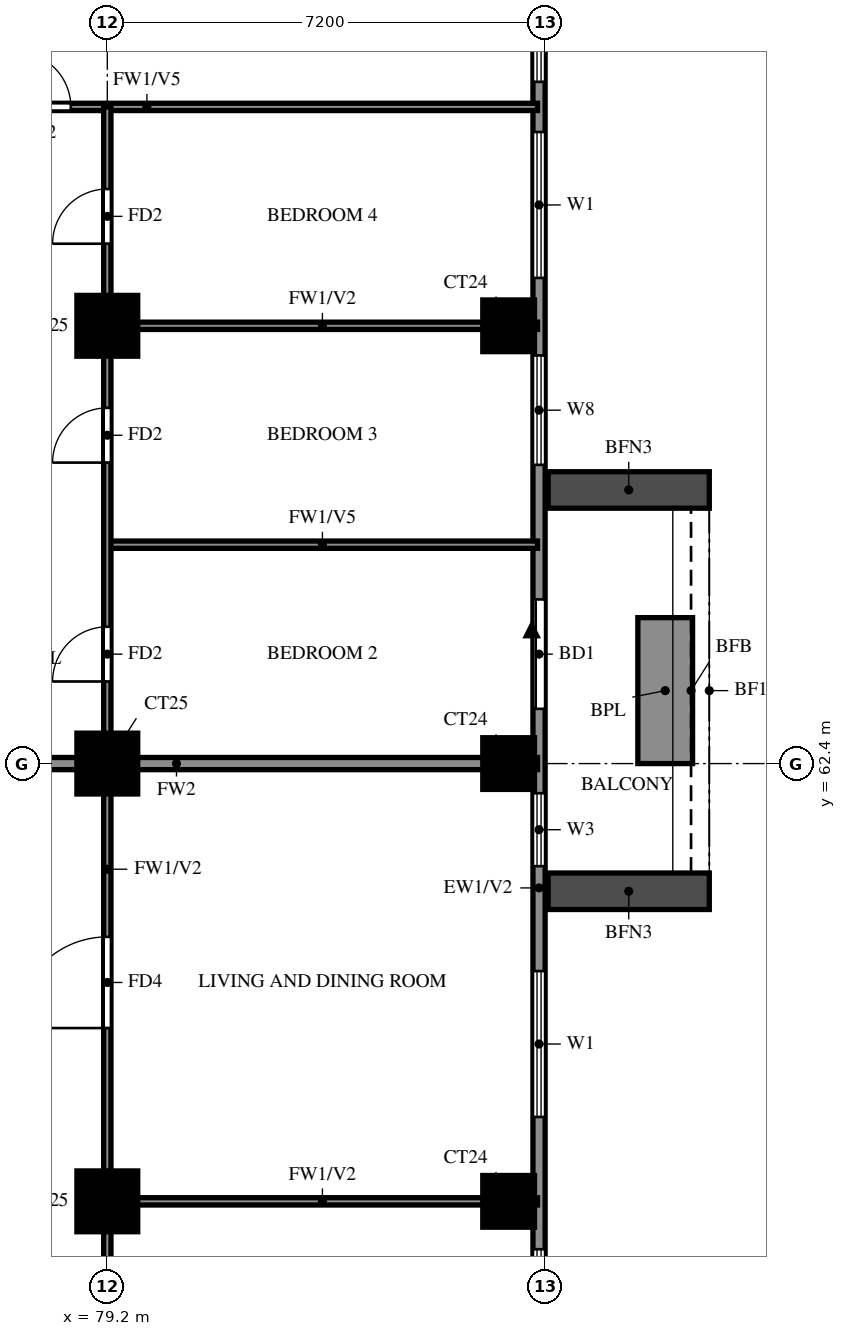
"""IFC4 building model, lengths in metres.
Left out: names, types, materials, properties, quantities, classifications, styles, units other than length and angle.
Written with IfcOpenShell. Run it as: python <this file> out.ifc"""

import sys

from ifc_helpers import new_model, si_unit, direction, frame, frame_2d, origin, origin_2d, place, context, subcontext, project, spatial, rectangle, extrude, source, transform, mapped, element, fill, save


model = new_model("IFC4")
c1 = context("Model", 3, precision=1e-05, world=origin(), true_north=direction((0.0, 1.0)))
c2 = subcontext(c1, "Body", "Model", "MODEL_VIEW")
j1 = project(units=[si_unit("LENGTHUNIT", "METRE"), si_unit("PLANEANGLEUNIT", "RADIAN")], contexts=[c1])
p1 = place(None, origin())
s1 = spatial("IfcSite", under=j1, at=p1, CompositionType="ELEMENT")
p2 = place(p1, origin())
s2 = spatial("IfcBuilding", under=s1, at=p2, CompositionType="ELEMENT")
p3 = place(p2, frame((0.0, 0.0, 153.5)))
s3 = spatial("IfcBuildingStorey", under=s2, at=p3, CompositionType="ELEMENT", Elevation=153.5)
m1 = source(origin(), c2, "Body", "SweptSolid", [
    extrude(rectangle(XDim=1.0, YDim=1.0, at=origin_2d()), origin(), (0.0, 0.0, 1.0), 3.2),
])
p4 = place(p3, frame((79.2, 55.2, 0.0), z_axis=(0.0, 0.0, 1.0), x_axis=(1.0, 0.0, 0.0)))
e1 = element("IfcColumn", 1, at=p4, inside=s3, PredefinedType="COLUMN", context=c2, shape_type="MappedRepresentation", body=[
    mapped(m1, transform((0.0, 0.0, 0.0))),
])
m2 = source(origin(), c2, "Body", "SweptSolid", [
    extrude(rectangle(XDim=0.85, YDim=0.85, at=origin_2d()), origin(), (0.0, 0.0, 1.0), 3.2),
])
p5 = place(p3, frame((85.8, 55.2, 0.0), z_axis=(0.0, 0.0, 1.0), x_axis=(1.0, 0.0, 0.0)))
e2 = element("IfcColumn", 2, at=p5, inside=s3, PredefinedType="COLUMN", context=c2, shape_type="MappedRepresentation", body=[
    mapped(m2, transform((0.0, 0.0, 0.0))),
])
p6 = place(p3, frame((79.2, 62.4, 0.0), z_axis=(0.0, 0.0, 1.0), x_axis=(1.0, 0.0, 0.0)))
e3 = element("IfcColumn", 3, at=p6, inside=s3, PredefinedType="COLUMN", context=c2, shape_type="MappedRepresentation", body=[
    mapped(m1, transform((0.0, 0.0, 0.0))),
])
p7 = place(p3, frame((85.8, 62.4, 0.0), z_axis=(0.0, 0.0, 1.0), x_axis=(1.0, 0.0, 0.0)))
e4 = element("IfcColumn", 4, at=p7, inside=s3, PredefinedType="COLUMN", context=c2, shape_type="MappedRepresentation", body=[
    mapped(m2, transform((0.0, 0.0, 0.0))),
])
p8 = place(p3, frame((79.2, 69.6, 0.0), z_axis=(0.0, 0.0, 1.0), x_axis=(1.0, 0.0, 0.0)))
e5 = element("IfcColumn", 5, at=p8, inside=s3, PredefinedType="COLUMN", context=c2, shape_type="MappedRepresentation", body=[
    mapped(m1, transform((0.0, 0.0, 0.0))),
])
p9 = place(p3, frame((85.8, 69.6, 0.0), z_axis=(0.0, 0.0, 1.0), x_axis=(1.0, 0.0, 0.0)))
e6 = element("IfcColumn", 6, at=p9, inside=s3, PredefinedType="COLUMN", context=c2, shape_type="MappedRepresentation", body=[
    mapped(m2, transform((0.0, 0.0, 0.0))),
])
p10 = place(p3, frame((86.3, 48.2, 0.0), z_axis=(0.0, 0.0, 1.0), x_axis=(0.0, 1.0, 0.0)))
e7 = element("IfcWall", 7, at=p10, inside=s3, PredefinedType="SOLIDWALL", context=c2, shape_type="SweptSolid", body=[
    extrude(rectangle(XDim=28.6, YDim=0.2, at=frame_2d((14.3, 0.0))), origin(), (0.0, 0.0, 1.0), 3.2),
])
p11 = place(p10, frame((15.1, 0.0, 0.0)))
e8 = element("IfcOpeningElement", 8, at=p11, cuts=e7, PredefinedType="OPENING", context=c2, shape_type="SweptSolid", body=[
    extrude(rectangle(XDim=1.8, YDim=2.4, at=frame_2d((0.9, 1.2))), frame((0.0, 0.11, 0.0), z_axis=(0.0, -1.0, 0.0), x_axis=(1.0, 0.0, 0.0)), (0.0, 0.0, 1.0), 0.22),
])
p12 = place(p10, frame((0.6, 0.0, 0.6)))
e9 = element("IfcOpeningElement", 9, at=p12, cuts=e7, PredefinedType="OPENING", context=c2, shape_type="SweptSolid", body=[
    extrude(rectangle(XDim=2.4, YDim=2.4, at=frame_2d((1.2, 1.2))), frame((0.0, 0.11, 0.0), z_axis=(0.0, -1.0, 0.0), x_axis=(1.0, 0.0, 0.0)), (0.0, 0.0, 1.0), 0.22),
])
p13 = place(p10, frame((3.812, 0.0, 0.6)))
e10 = element("IfcOpeningElement", 10, at=p13, cuts=e7, PredefinedType="OPENING", context=c2, shape_type="SweptSolid", body=[
    extrude(rectangle(XDim=2.4, YDim=2.4, at=frame_2d((1.2, 1.2))), frame((0.0, 0.11, 0.0), z_axis=(0.0, -1.0, 0.0), x_axis=(1.0, 0.0, 0.0)), (0.0, 0.0, 1.0), 0.22),
])
p14 = place(p10, frame((8.387, 0.0, 0.6)))
e11 = element("IfcOpeningElement", 11, at=p14, cuts=e7, PredefinedType="OPENING", context=c2, shape_type="SweptSolid", body=[
    extrude(rectangle(XDim=2.4, YDim=2.4, at=frame_2d((1.2, 1.2))), frame((0.0, 0.11, 0.0), z_axis=(0.0, -1.0, 0.0), x_axis=(1.0, 0.0, 0.0)), (0.0, 0.0, 1.0), 0.22),
])
p15 = place(p10, frame((12.512, 0.0, 0.6)))
e12 = element("IfcOpeningElement", 12, at=p15, cuts=e7, PredefinedType="OPENING", context=c2, shape_type="SweptSolid", body=[
    extrude(rectangle(XDim=1.2, YDim=2.4, at=frame_2d((0.6, 1.2))), frame((0.0, 0.11, 0.0), z_axis=(0.0, -1.0, 0.0), x_axis=(1.0, 0.0, 0.0)), (0.0, 0.0, 1.0), 0.22),
])
p16 = place(p10, frame((19.113, 0.0, 0.6)))
e13 = element("IfcOpeningElement", 13, at=p16, cuts=e7, PredefinedType="OPENING", context=c2, shape_type="SweptSolid", body=[
    extrude(rectangle(XDim=1.8, YDim=2.4, at=frame_2d((0.9, 1.2))), frame((0.0, 0.11, 0.0), z_axis=(0.0, -1.0, 0.0), x_axis=(1.0, 0.0, 0.0)), (0.0, 0.0, 1.0), 0.22),
])
p17 = place(p10, frame((22.188, 0.0, 0.6)))
e14 = element("IfcOpeningElement", 14, at=p17, cuts=e7, PredefinedType="OPENING", context=c2, shape_type="SweptSolid", body=[
    extrude(rectangle(XDim=2.4, YDim=2.4, at=frame_2d((1.2, 1.2))), frame((0.0, 0.11, 0.0), z_axis=(0.0, -1.0, 0.0), x_axis=(1.0, 0.0, 0.0)), (0.0, 0.0, 1.0), 0.22),
])
p18 = place(p10, frame((25.413, 0.0, 0.6)))
e15 = element("IfcOpeningElement", 15, at=p18, cuts=e7, PredefinedType="OPENING", context=c2, shape_type="SweptSolid", body=[
    extrude(rectangle(XDim=2.4, YDim=2.4, at=frame_2d((1.2, 1.2))), frame((0.0, 0.11, 0.0), z_axis=(0.0, -1.0, 0.0), x_axis=(1.0, 0.0, 0.0)), (0.0, 0.0, 1.0), 0.22),
])
for number, where, z_axis, x_axis in (
    (16, (86.45, 60.3, 0.0), (0.0, 0.0, 1.0), (1.0, 0.0, 0.0)),
    (17, (86.45, 66.9, 0.0), (0.0, 0.0, 1.0), (1.0, 0.0, 0.0)),
):
    element("IfcWall", number, at=place(p3, frame(where, z_axis=z_axis, x_axis=x_axis)), inside=s3, PredefinedType="SOLIDWALL", context=c2, shape_type="SweptSolid", body=[
        extrude(rectangle(XDim=2.65, YDim=0.6, at=frame_2d((1.325, 0.0))), origin(), (0.0, 0.0, 1.0), 2.85),
    ])
p19 = place(p3, frame((88.375, 62.4, 0.0), z_axis=(0.0, 0.0, 1.0), x_axis=(0.0, 1.0, 0.0)))
e18 = element("IfcWall", 18, at=p19, inside=s3, PredefinedType="SOLIDWALL", context=c2, shape_type="SweptSolid", body=[
    extrude(rectangle(XDim=2.4, YDim=0.9, at=frame_2d((1.2, 0.0))), origin(), (0.0, 0.0, 1.0), 0.9),
])
p20 = place(p3, frame((74.4, 62.4, 0.0), z_axis=(0.0, 0.0, 1.0), x_axis=(1.0, 0.0, 0.0)))
e19 = element("IfcWall", 19, at=p20, inside=s3, PredefinedType="SOLIDWALL", context=c2, shape_type="SweptSolid", body=[
    extrude(rectangle(XDim=11.875, YDim=0.2, at=frame_2d((5.938, 0.0))), origin(), (0.0, 0.0, 1.0), 3.2),
])
p21 = place(p3, frame((79.2, 55.2, 0.0), z_axis=(0.0, 0.0, 1.0), x_axis=(1.0, 0.0, 0.0)))
e20 = element("IfcWall", 20, at=p21, inside=s3, PredefinedType="PARTITIONING", context=c2, shape_type="SweptSolid", body=[
    extrude(rectangle(XDim=7.075, YDim=0.12, at=frame_2d((3.538, 0.0))), origin(), (0.0, 0.0, 1.0), 3.2),
])
p22 = place(p3, frame((79.2, 66.0, 0.0), z_axis=(0.0, 0.0, 1.0), x_axis=(1.0, 0.0, 0.0)))
e21 = element("IfcWall", 21, at=p22, inside=s3, PredefinedType="PARTITIONING", context=c2, shape_type="SweptSolid", body=[
    extrude(rectangle(XDim=7.075, YDim=0.12, at=frame_2d((3.538, 0.0))), origin(), (0.0, 0.0, 1.0), 2.3),
])
p23 = place(p3, frame((79.2, 69.6, 0.0), z_axis=(0.0, 0.0, 1.0), x_axis=(1.0, 0.0, 0.0)))
e22 = element("IfcWall", 22, at=p23, inside=s3, PredefinedType="PARTITIONING", context=c2, shape_type="SweptSolid", body=[
    extrude(rectangle(XDim=7.075, YDim=0.12, at=frame_2d((3.538, 0.0))), origin(), (0.0, 0.0, 1.0), 3.2),
])
p24 = place(p3, frame((72.0, 73.2, 0.0), z_axis=(0.0, 0.0, 1.0), x_axis=(1.0, 0.0, 0.0)))
e23 = element("IfcWall", 23, at=p24, inside=s3, PredefinedType="PARTITIONING", context=c2, shape_type="SweptSolid", body=[
    extrude(rectangle(XDim=14.275, YDim=0.12, at=frame_2d((7.137, 0.0))), origin(), (0.0, 0.0, 1.0), 2.3),
])
p25 = place(p24, frame((5.7, 0.0, 0.0)))
e24 = element("IfcOpeningElement", 24, at=p25, cuts=e23, PredefinedType="OPENING", context=c2, shape_type="SweptSolid", body=[
    extrude(rectangle(XDim=0.9, YDim=2.1, at=frame_2d((0.45, 1.05))), frame((0.0, 0.07, 0.0), z_axis=(0.0, -1.0, 0.0), x_axis=(1.0, 0.0, 0.0)), (0.0, 0.0, 1.0), 0.14),
])
p26 = place(p3, frame((79.2, 48.125, 0.0), z_axis=(0.0, 0.0, 1.0), x_axis=(0.0, 1.0, 0.0)))
e25 = element("IfcWall", 25, at=p26, inside=s3, PredefinedType="PARTITIONING", context=c2, shape_type="SweptSolid", body=[
    extrude(rectangle(XDim=25.075, YDim=0.12, at=frame_2d((12.538, 0.0))), origin(), (0.0, 0.0, 1.0), 3.2),
])
p27 = place(p26, frame((1.288, 0.0, 0.0)))
e26 = element("IfcOpeningElement", 26, at=p27, cuts=e25, PredefinedType="OPENING", context=c2, shape_type="SweptSolid", body=[
    extrude(rectangle(XDim=0.9, YDim=2.1, at=frame_2d((0.45, 1.05))), frame((0.0, 0.07, 0.0), z_axis=(0.0, -1.0, 0.0), x_axis=(1.0, 0.0, 0.0)), (0.0, 0.0, 1.0), 0.14),
])
p28 = place(p26, frame((4.825, 0.0, 0.0)))
e27 = element("IfcOpeningElement", 27, at=p28, cuts=e25, PredefinedType="OPENING", context=c2, shape_type="SweptSolid", body=[
    extrude(rectangle(XDim=0.9, YDim=2.1, at=frame_2d((0.45, 1.05))), frame((0.0, 0.07, 0.0), z_axis=(0.0, -1.0, 0.0), x_axis=(1.0, 0.0, 0.0)), (0.0, 0.0, 1.0), 0.14),
])
p29 = place(p26, frame((9.925, 0.0, 0.0)))
e28 = element("IfcOpeningElement", 28, at=p29, cuts=e25, PredefinedType="OPENING", context=c2, shape_type="SweptSolid", body=[
    extrude(rectangle(XDim=1.5, YDim=2.1, at=frame_2d((0.75, 1.05))), frame((0.0, 0.07, 0.0), z_axis=(0.0, -1.0, 0.0), x_axis=(1.0, 0.0, 0.0)), (0.0, 0.0, 1.0), 0.14),
])
p30 = place(p26, frame((15.625, 0.0, 0.0)))
e29 = element("IfcOpeningElement", 29, at=p30, cuts=e25, PredefinedType="OPENING", context=c2, shape_type="SweptSolid", body=[
    extrude(rectangle(XDim=0.9, YDim=2.1, at=frame_2d((0.45, 1.05))), frame((0.0, 0.07, 0.0), z_axis=(0.0, -1.0, 0.0), x_axis=(1.0, 0.0, 0.0)), (0.0, 0.0, 1.0), 0.14),
])
p31 = place(p26, frame((19.225, 0.0, 0.0)))
e30 = element("IfcOpeningElement", 30, at=p31, cuts=e25, PredefinedType="OPENING", context=c2, shape_type="SweptSolid", body=[
    extrude(rectangle(XDim=0.9, YDim=2.1, at=frame_2d((0.45, 1.05))), frame((0.0, 0.07, 0.0), z_axis=(0.0, -1.0, 0.0), x_axis=(1.0, 0.0, 0.0)), (0.0, 0.0, 1.0), 0.14),
])
p32 = place(p26, frame((22.825, 0.0, 0.0)))
e31 = element("IfcOpeningElement", 31, at=p32, cuts=e25, PredefinedType="OPENING", context=c2, shape_type="SweptSolid", body=[
    extrude(rectangle(XDim=0.9, YDim=2.1, at=frame_2d((0.45, 1.05))), frame((0.0, 0.07, 0.0), z_axis=(0.0, -1.0, 0.0), x_axis=(1.0, 0.0, 0.0)), (0.0, 0.0, 1.0), 0.14),
])
p33 = place(p11, origin())
e32 = element("IfcDoor", 32, at=p33, inside=s3, OperationType="DOUBLE_DOOR_SLIDING", PredefinedType="DOOR", context=c2, shape_type="SweptSolid", body=[
    extrude(rectangle(XDim=1.8, YDim=2.4, at=frame_2d((0.9, 1.2))), frame((0.0, 0.025, 0.0), z_axis=(0.0, -1.0, 0.0), x_axis=(1.0, 0.0, 0.0)), (0.0, 0.0, 1.0), 0.05),
])
fill(e8, e32)
p34 = place(p13, origin())
e33 = element("IfcWindow", 33, at=p34, inside=s3, PartitioningType="DOUBLE_PANEL_VERTICAL", PredefinedType="WINDOW", context=c2, shape_type="SweptSolid", body=[
    extrude(rectangle(XDim=2.4, YDim=2.4, at=frame_2d((1.2, 1.2))), frame((0.0, 0.03, 0.0), z_axis=(0.0, -1.0, 0.0), x_axis=(1.0, 0.0, 0.0)), (0.0, 0.0, 1.0), 0.06),
])
fill(e10, e33)
p35 = place(p14, origin())
e34 = element("IfcWindow", 34, at=p35, inside=s3, PartitioningType="DOUBLE_PANEL_VERTICAL", PredefinedType="WINDOW", context=c2, shape_type="SweptSolid", body=[
    extrude(rectangle(XDim=2.4, YDim=2.4, at=frame_2d((1.2, 1.2))), frame((0.0, 0.03, 0.0), z_axis=(0.0, -1.0, 0.0), x_axis=(1.0, 0.0, 0.0)), (0.0, 0.0, 1.0), 0.06),
])
fill(e11, e34)
p36 = place(p15, origin())
e35 = element("IfcWindow", 35, at=p36, inside=s3, PartitioningType="SINGLE_PANEL", PredefinedType="WINDOW", context=c2, shape_type="SweptSolid", body=[
    extrude(rectangle(XDim=1.2, YDim=2.4, at=frame_2d((0.6, 1.2))), frame((0.0, 0.03, 0.0), z_axis=(0.0, -1.0, 0.0), x_axis=(1.0, 0.0, 0.0)), (0.0, 0.0, 1.0), 0.06),
])
fill(e12, e35)
p37 = place(p16, origin())
e36 = element("IfcWindow", 36, at=p37, inside=s3, PartitioningType="DOUBLE_PANEL_VERTICAL", PredefinedType="WINDOW", context=c2, shape_type="SweptSolid", body=[
    extrude(rectangle(XDim=1.8, YDim=2.4, at=frame_2d((0.9, 1.2))), frame((0.0, 0.03, 0.0), z_axis=(0.0, -1.0, 0.0), x_axis=(1.0, 0.0, 0.0)), (0.0, 0.0, 1.0), 0.06),
])
fill(e13, e36)
p38 = place(p17, origin())
e37 = element("IfcWindow", 37, at=p38, inside=s3, PartitioningType="DOUBLE_PANEL_VERTICAL", PredefinedType="WINDOW", context=c2, shape_type="SweptSolid", body=[
    extrude(rectangle(XDim=2.4, YDim=2.4, at=frame_2d((1.2, 1.2))), frame((0.0, 0.03, 0.0), z_axis=(0.0, -1.0, 0.0), x_axis=(1.0, 0.0, 0.0)), (0.0, 0.0, 1.0), 0.06),
])
fill(e14, e37)
p39 = place(p18, origin())
e38 = element("IfcWindow", 38, at=p39, inside=s3, PartitioningType="DOUBLE_PANEL_VERTICAL", PredefinedType="WINDOW", context=c2, shape_type="SweptSolid", body=[
    extrude(rectangle(XDim=2.4, YDim=2.4, at=frame_2d((1.2, 1.2))), frame((0.0, 0.03, 0.0), z_axis=(0.0, -1.0, 0.0), x_axis=(1.0, 0.0, 0.0)), (0.0, 0.0, 1.0), 0.06),
])
fill(e15, e38)
p40 = place(p29, origin())
e39 = element("IfcDoor", 39, at=p40, inside=s3, OperationType="SINGLE_SWING_LEFT", PredefinedType="DOOR", context=c2, shape_type="SweptSolid", body=[
    extrude(rectangle(XDim=1.5, YDim=2.1, at=frame_2d((0.75, 1.05))), frame((0.0, 0.025, 0.0), z_axis=(0.0, -1.0, 0.0), x_axis=(1.0, 0.0, 0.0)), (0.0, 0.0, 1.0), 0.05),
])
fill(e28, e39)
p41 = place(p30, origin())
e40 = element("IfcDoor", 40, at=p41, inside=s3, OperationType="SINGLE_SWING_RIGHT", PredefinedType="DOOR", context=c2, shape_type="SweptSolid", body=[
    extrude(rectangle(XDim=0.9, YDim=2.1, at=frame_2d((0.45, 1.05))), frame((0.0, 0.025, 0.0), z_axis=(0.0, -1.0, 0.0), x_axis=(1.0, 0.0, 0.0)), (0.0, 0.0, 1.0), 0.05),
])
fill(e29, e40)
p42 = place(p31, origin())
e41 = element("IfcDoor", 41, at=p42, inside=s3, OperationType="SINGLE_SWING_LEFT", PredefinedType="DOOR", context=c2, shape_type="SweptSolid", body=[
    extrude(rectangle(XDim=0.9, YDim=2.1, at=frame_2d((0.45, 1.05))), frame((0.0, 0.025, 0.0), z_axis=(0.0, -1.0, 0.0), x_axis=(1.0, 0.0, 0.0)), (0.0, 0.0, 1.0), 0.05),
])
fill(e30, e41)
p43 = place(p32, origin())
e42 = element("IfcDoor", 42, at=p43, inside=s3, OperationType="SINGLE_SWING_LEFT", PredefinedType="DOOR", context=c2, shape_type="SweptSolid", body=[
    extrude(rectangle(XDim=0.9, YDim=2.1, at=frame_2d((0.45, 1.05))), frame((0.0, 0.025, 0.0), z_axis=(0.0, -1.0, 0.0), x_axis=(1.0, 0.0, 0.0)), (0.0, 0.0, 1.0), 0.05),
])
fill(e31, e42)
p44 = place(p25, origin())
e43 = element("IfcDoor", 43, at=p44, inside=s3, OperationType="SINGLE_SWING_RIGHT", PredefinedType="DOOR", context=c2, shape_type="SweptSolid", body=[
    extrude(rectangle(XDim=0.9, YDim=2.1, at=frame_2d((0.45, 1.05))), frame((0.0, 0.025, 0.0), z_axis=(0.0, -1.0, 0.0), x_axis=(1.0, 0.0, 0.0)), (0.0, 0.0, 1.0), 0.05),
])
fill(e24, e43)
save(model, sys.argv[1])
